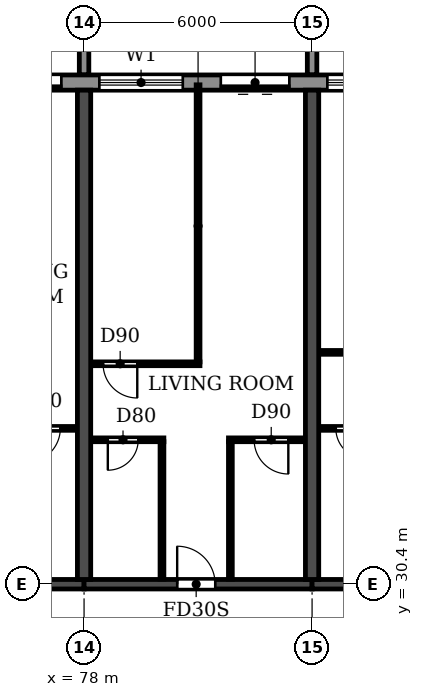
"""IFC4 building model, lengths in metres.
Left out: names, types, materials, properties, quantities, classifications, styles, units other than length and angle.
Written with IfcOpenShell. Run it as: python <this file> out.ifc"""

import sys

from ifc_helpers import new_model, si_unit, direction, frame, frame_2d, origin, place, context, subcontext, project, spatial, polyline, rectangle, outline, extrude, source, transform, mapped, element, fill, save


model = new_model("IFC4")
c1 = context("Model", 3, precision=1e-05, world=origin(), true_north=direction((0.0, 1.0)))
c2 = subcontext(c1, "Body", "Model", "MODEL_VIEW")
j1 = project(units=[si_unit("LENGTHUNIT", "METRE"), si_unit("PLANEANGLEUNIT", "RADIAN")], contexts=[c1])
p1 = place(None, origin())
s1 = spatial("IfcSite", under=j1, at=p1, CompositionType="ELEMENT")
p2 = place(p1, origin())
s2 = spatial("IfcBuilding", under=s1, at=p2, CompositionType="ELEMENT")
p3 = place(p2, frame((0.0, 0.0, 92.7)))
s3 = spatial("IfcBuildingStorey", under=s2, at=p3, CompositionType="ELEMENT", Elevation=92.7)
for number, where, z_axis, x_axis in (
    (1, (78.0, 30.525, 0.0), (0.0, 0.0, 1.0), (0.0, 1.0, 0.0)),
    (2, (84.0, 30.525, 0.0), (0.0, 0.0, 1.0), (0.0, 1.0, 0.0)),
):
    element("IfcWall", number, at=place(p3, frame(where, z_axis=z_axis, x_axis=x_axis)), inside=s3, PredefinedType="SHEAR", context=c2, shape_type="SweptSolid", body=[
        extrude(rectangle(XDim=12.875, YDim=0.35, at=frame_2d((6.438, 0.0))), origin(), (0.0, 0.0, 1.0), 3.06),
    ])
p4 = place(p3, frame((72.0, 30.4, 0.0), z_axis=(0.0, 0.0, 1.0), x_axis=(1.0, 0.0, 0.0)))
e3 = element("IfcWall", 3, at=p4, inside=s3, PredefinedType="SHEAR", context=c2, shape_type="SweptSolid", body=[
    extrude(rectangle(XDim=6.0, YDim=0.25, at=frame_2d((3.0, 0.0))), origin(), (0.0, 0.0, 1.0), 2.46),
])
p5 = place(p4, frame((2.45, 0.0, 0.0)))
e4 = element("IfcOpeningElement", 4, at=p5, cuts=e3, PredefinedType="OPENING", context=c2, shape_type="SweptSolid", body=[
    extrude(rectangle(XDim=1.0, YDim=2.1, at=frame_2d((0.5, 1.05))), frame((0.0, 0.135, 0.0), z_axis=(0.0, -1.0, 0.0), x_axis=(1.0, 0.0, 0.0)), (0.0, 0.0, 1.0), 0.27),
])
p6 = place(p3, frame((78.0, 30.4, 0.0), z_axis=(0.0, 0.0, 1.0), x_axis=(1.0, 0.0, 0.0)))
e5 = element("IfcWall", 5, at=p6, inside=s3, PredefinedType="SHEAR", context=c2, shape_type="SweptSolid", body=[
    extrude(rectangle(XDim=6.0, YDim=0.25, at=frame_2d((3.0, 0.0))), origin(), (0.0, 0.0, 1.0), 2.46),
])
p7 = place(p6, frame((2.45, 0.0, 0.0)))
e6 = element("IfcOpeningElement", 6, at=p7, cuts=e5, PredefinedType="OPENING", context=c2, shape_type="SweptSolid", body=[
    extrude(rectangle(XDim=1.0, YDim=2.1, at=frame_2d((0.5, 1.05))), frame((0.0, 0.135, 0.0), z_axis=(0.0, -1.0, 0.0), x_axis=(1.0, 0.0, 0.0)), (0.0, 0.0, 1.0), 0.27),
])
p8 = place(p3, frame((84.0, 30.4, 0.0), z_axis=(0.0, 0.0, 1.0), x_axis=(1.0, 0.0, 0.0)))
e7 = element("IfcWall", 7, at=p8, inside=s3, PredefinedType="SHEAR", context=c2, shape_type="SweptSolid", body=[
    extrude(rectangle(XDim=6.0, YDim=0.25, at=frame_2d((3.0, 0.0))), origin(), (0.0, 0.0, 1.0), 2.46),
])
p9 = place(p8, frame((2.45, 0.0, 0.0)))
e8 = element("IfcOpeningElement", 8, at=p9, cuts=e7, PredefinedType="OPENING", context=c2, shape_type="SweptSolid", body=[
    extrude(rectangle(XDim=1.0, YDim=2.1, at=frame_2d((0.5, 1.05))), frame((0.0, 0.135, 0.0), z_axis=(0.0, -1.0, 0.0), x_axis=(1.0, 0.0, 0.0)), (0.0, 0.0, 1.0), 0.27),
])
p10 = place(p3, frame((91.317, 43.6, 0.0), z_axis=(0.0, 0.0, 1.0), x_axis=(-1.0, 0.0, 0.0)))
e9 = element("IfcWall", 9, at=p10, inside=s3, PredefinedType="STANDARD", context=c2, shape_type="SweptSolid", body=[
    extrude(rectangle(XDim=80.634, YDim=0.4, at=frame_2d((40.317, 0.0))), origin(), (0.0, 0.0, 1.0), 3.06),
])
p11 = place(p10, frame((76.717, 0.0, 0.9)))
e10 = element("IfcOpeningElement", 10, at=p11, cuts=e9, PredefinedType="OPENING", context=c2, shape_type="SweptSolid", body=[
    extrude(rectangle(XDim=2.2, YDim=1.5, at=frame_2d((1.1, 0.75))), frame((0.0, 0.21, 0.0), z_axis=(0.0, -1.0, 0.0), x_axis=(1.0, 0.0, 0.0)), (0.0, 0.0, 1.0), 0.42),
])
p12 = place(p10, frame((73.917, 0.0, 0.0)))
e11 = element("IfcOpeningElement", 11, at=p12, cuts=e9, PredefinedType="OPENING", context=c2, shape_type="SweptSolid", body=[
    extrude(rectangle(XDim=1.8, YDim=2.4, at=frame_2d((0.9, 1.2))), frame((0.0, 0.21, 0.0), z_axis=(0.0, -1.0, 0.0), x_axis=(1.0, 0.0, 0.0)), (0.0, 0.0, 1.0), 0.42),
])
p13 = place(p10, frame((70.717, 0.0, 0.9)))
e12 = element("IfcOpeningElement", 12, at=p13, cuts=e9, PredefinedType="OPENING", context=c2, shape_type="SweptSolid", body=[
    extrude(rectangle(XDim=2.2, YDim=1.5, at=frame_2d((1.1, 0.75))), frame((0.0, 0.21, 0.0), z_axis=(0.0, -1.0, 0.0), x_axis=(1.0, 0.0, 0.0)), (0.0, 0.0, 1.0), 0.42),
])
p14 = place(p10, frame((67.717, 0.0, 0.9)))
e13 = element("IfcOpeningElement", 13, at=p14, cuts=e9, PredefinedType="OPENING", context=c2, shape_type="SweptSolid", body=[
    extrude(rectangle(XDim=2.2, YDim=1.5, at=frame_2d((1.1, 0.75))), frame((0.0, 0.21, 0.0), z_axis=(0.0, -1.0, 0.0), x_axis=(1.0, 0.0, 0.0)), (0.0, 0.0, 1.0), 0.42),
])
p15 = place(p10, frame((64.717, 0.0, 0.9)))
e14 = element("IfcOpeningElement", 14, at=p15, cuts=e9, PredefinedType="OPENING", context=c2, shape_type="SweptSolid", body=[
    extrude(rectangle(XDim=2.2, YDim=1.5, at=frame_2d((1.1, 0.75))), frame((0.0, 0.21, 0.0), z_axis=(0.0, -1.0, 0.0), x_axis=(1.0, 0.0, 0.0)), (0.0, 0.0, 1.0), 0.42),
])
p16 = place(p10, frame((61.917, 0.0, 0.0)))
e15 = element("IfcOpeningElement", 15, at=p16, cuts=e9, PredefinedType="OPENING", context=c2, shape_type="SweptSolid", body=[
    extrude(rectangle(XDim=1.8, YDim=2.4, at=frame_2d((0.9, 1.2))), frame((0.0, 0.21, 0.0), z_axis=(0.0, -1.0, 0.0), x_axis=(1.0, 0.0, 0.0)), (0.0, 0.0, 1.0), 0.42),
])
p17 = place(p10, frame((58.717, 0.0, 0.9)))
e16 = element("IfcOpeningElement", 16, at=p17, cuts=e9, PredefinedType="OPENING", context=c2, shape_type="SweptSolid", body=[
    extrude(rectangle(XDim=2.2, YDim=1.5, at=frame_2d((1.1, 0.75))), frame((0.0, 0.21, 0.0), z_axis=(0.0, -1.0, 0.0), x_axis=(1.0, 0.0, 0.0)), (0.0, 0.0, 1.0), 0.42),
])
p18 = place(p10, frame((55.717, 0.0, 0.9)))
e17 = element("IfcOpeningElement", 17, at=p18, cuts=e9, PredefinedType="OPENING", context=c2, shape_type="SweptSolid", body=[
    extrude(rectangle(XDim=2.2, YDim=1.5, at=frame_2d((1.1, 0.75))), frame((0.0, 0.21, 0.0), z_axis=(0.0, -1.0, 0.0), x_axis=(1.0, 0.0, 0.0)), (0.0, 0.0, 1.0), 0.42),
])
p19 = place(p10, frame((52.917, 0.0, 0.0)))
e18 = element("IfcOpeningElement", 18, at=p19, cuts=e9, PredefinedType="OPENING", context=c2, shape_type="SweptSolid", body=[
    extrude(rectangle(XDim=1.8, YDim=2.4, at=frame_2d((0.9, 1.2))), frame((0.0, 0.21, 0.0), z_axis=(0.0, -1.0, 0.0), x_axis=(1.0, 0.0, 0.0)), (0.0, 0.0, 1.0), 0.42),
])
p20 = place(p10, frame((49.717, 0.0, 0.9)))
e19 = element("IfcOpeningElement", 19, at=p20, cuts=e9, PredefinedType="OPENING", context=c2, shape_type="SweptSolid", body=[
    extrude(rectangle(XDim=2.2, YDim=1.5, at=frame_2d((1.1, 0.75))), frame((0.0, 0.21, 0.0), z_axis=(0.0, -1.0, 0.0), x_axis=(1.0, 0.0, 0.0)), (0.0, 0.0, 1.0), 0.42),
])
p21 = place(p10, frame((46.717, 0.0, 0.9)))
e20 = element("IfcOpeningElement", 20, at=p21, cuts=e9, PredefinedType="OPENING", context=c2, shape_type="SweptSolid", body=[
    extrude(rectangle(XDim=2.2, YDim=1.5, at=frame_2d((1.1, 0.75))), frame((0.0, 0.21, 0.0), z_axis=(0.0, -1.0, 0.0), x_axis=(1.0, 0.0, 0.0)), (0.0, 0.0, 1.0), 0.42),
])
p22 = place(p10, frame((43.717, 0.0, 0.9)))
e21 = element("IfcOpeningElement", 21, at=p22, cuts=e9, PredefinedType="OPENING", context=c2, shape_type="SweptSolid", body=[
    extrude(rectangle(XDim=2.2, YDim=1.5, at=frame_2d((1.1, 0.75))), frame((0.0, 0.21, 0.0), z_axis=(0.0, -1.0, 0.0), x_axis=(1.0, 0.0, 0.0)), (0.0, 0.0, 1.0), 0.42),
])
p23 = place(p10, frame((40.717, 0.0, 0.9)))
e22 = element("IfcOpeningElement", 22, at=p23, cuts=e9, PredefinedType="OPENING", context=c2, shape_type="SweptSolid", body=[
    extrude(rectangle(XDim=2.2, YDim=1.5, at=frame_2d((1.1, 0.75))), frame((0.0, 0.21, 0.0), z_axis=(0.0, -1.0, 0.0), x_axis=(1.0, 0.0, 0.0)), (0.0, 0.0, 1.0), 0.42),
])
p24 = place(p10, frame((37.917, 0.0, 0.0)))
e23 = element("IfcOpeningElement", 23, at=p24, cuts=e9, PredefinedType="OPENING", context=c2, shape_type="SweptSolid", body=[
    extrude(rectangle(XDim=1.8, YDim=2.4, at=frame_2d((0.9, 1.2))), frame((0.0, 0.21, 0.0), z_axis=(0.0, -1.0, 0.0), x_axis=(1.0, 0.0, 0.0)), (0.0, 0.0, 1.0), 0.42),
])
p25 = place(p10, frame((34.917, 0.0, 0.0)))
e24 = element("IfcOpeningElement", 24, at=p25, cuts=e9, PredefinedType="OPENING", context=c2, shape_type="SweptSolid", body=[
    extrude(rectangle(XDim=1.8, YDim=2.4, at=frame_2d((0.9, 1.2))), frame((0.0, 0.21, 0.0), z_axis=(0.0, -1.0, 0.0), x_axis=(1.0, 0.0, 0.0)), (0.0, 0.0, 1.0), 0.42),
])
p26 = place(p10, frame((31.717, 0.0, 0.9)))
e25 = element("IfcOpeningElement", 25, at=p26, cuts=e9, PredefinedType="OPENING", context=c2, shape_type="SweptSolid", body=[
    extrude(rectangle(XDim=2.2, YDim=1.5, at=frame_2d((1.1, 0.75))), frame((0.0, 0.21, 0.0), z_axis=(0.0, -1.0, 0.0), x_axis=(1.0, 0.0, 0.0)), (0.0, 0.0, 1.0), 0.42),
])
p27 = place(p10, frame((28.717, 0.0, 0.9)))
e26 = element("IfcOpeningElement", 26, at=p27, cuts=e9, PredefinedType="OPENING", context=c2, shape_type="SweptSolid", body=[
    extrude(rectangle(XDim=2.2, YDim=1.5, at=frame_2d((1.1, 0.75))), frame((0.0, 0.21, 0.0), z_axis=(0.0, -1.0, 0.0), x_axis=(1.0, 0.0, 0.0)), (0.0, 0.0, 1.0), 0.42),
])
p28 = place(p10, frame((25.717, 0.0, 0.9)))
e27 = element("IfcOpeningElement", 27, at=p28, cuts=e9, PredefinedType="OPENING", context=c2, shape_type="SweptSolid", body=[
    extrude(rectangle(XDim=2.2, YDim=1.5, at=frame_2d((1.1, 0.75))), frame((0.0, 0.21, 0.0), z_axis=(0.0, -1.0, 0.0), x_axis=(1.0, 0.0, 0.0)), (0.0, 0.0, 1.0), 0.42),
])
p29 = place(p10, frame((22.717, 0.0, 0.9)))
e28 = element("IfcOpeningElement", 28, at=p29, cuts=e9, PredefinedType="OPENING", context=c2, shape_type="SweptSolid", body=[
    extrude(rectangle(XDim=2.2, YDim=1.5, at=frame_2d((1.1, 0.75))), frame((0.0, 0.21, 0.0), z_axis=(0.0, -1.0, 0.0), x_axis=(1.0, 0.0, 0.0)), (0.0, 0.0, 1.0), 0.42),
])
p30 = place(p10, frame((19.917, 0.0, 0.0)))
e29 = element("IfcOpeningElement", 29, at=p30, cuts=e9, PredefinedType="OPENING", context=c2, shape_type="SweptSolid", body=[
    extrude(rectangle(XDim=1.8, YDim=2.4, at=frame_2d((0.9, 1.2))), frame((0.0, 0.21, 0.0), z_axis=(0.0, -1.0, 0.0), x_axis=(1.0, 0.0, 0.0)), (0.0, 0.0, 1.0), 0.42),
])
p31 = place(p10, frame((16.717, 0.0, 0.9)))
e30 = element("IfcOpeningElement", 30, at=p31, cuts=e9, PredefinedType="OPENING", context=c2, shape_type="SweptSolid", body=[
    extrude(rectangle(XDim=2.2, YDim=1.5, at=frame_2d((1.1, 0.75))), frame((0.0, 0.21, 0.0), z_axis=(0.0, -1.0, 0.0), x_axis=(1.0, 0.0, 0.0)), (0.0, 0.0, 1.0), 0.42),
])
p32 = place(p10, frame((13.917, 0.0, 0.0)))
e31 = element("IfcOpeningElement", 31, at=p32, cuts=e9, PredefinedType="OPENING", context=c2, shape_type="SweptSolid", body=[
    extrude(rectangle(XDim=1.8, YDim=2.4, at=frame_2d((0.9, 1.2))), frame((0.0, 0.21, 0.0), z_axis=(0.0, -1.0, 0.0), x_axis=(1.0, 0.0, 0.0)), (0.0, 0.0, 1.0), 0.42),
])
p33 = place(p10, frame((10.717, 0.0, 0.9)))
e32 = element("IfcOpeningElement", 32, at=p33, cuts=e9, PredefinedType="OPENING", context=c2, shape_type="SweptSolid", body=[
    extrude(rectangle(XDim=2.2, YDim=1.5, at=frame_2d((1.1, 0.75))), frame((0.0, 0.21, 0.0), z_axis=(0.0, -1.0, 0.0), x_axis=(1.0, 0.0, 0.0)), (0.0, 0.0, 1.0), 0.42),
])
p34 = place(p10, frame((7.917, 0.0, 0.0)))
e33 = element("IfcOpeningElement", 33, at=p34, cuts=e9, PredefinedType="OPENING", context=c2, shape_type="SweptSolid", body=[
    extrude(rectangle(XDim=1.8, YDim=2.4, at=frame_2d((0.9, 1.2))), frame((0.0, 0.21, 0.0), z_axis=(0.0, -1.0, 0.0), x_axis=(1.0, 0.0, 0.0)), (0.0, 0.0, 1.0), 0.42),
])
p35 = place(p10, frame((4.717, 0.0, 0.9)))
e34 = element("IfcOpeningElement", 34, at=p35, cuts=e9, PredefinedType="OPENING", context=c2, shape_type="SweptSolid", body=[
    extrude(rectangle(XDim=2.2, YDim=1.5, at=frame_2d((1.1, 0.75))), frame((0.0, 0.21, 0.0), z_axis=(0.0, -1.0, 0.0), x_axis=(1.0, 0.0, 0.0)), (0.0, 0.0, 1.0), 0.42),
])
p36 = place(p10, frame((1.917, 0.0, 0.0)))
e35 = element("IfcOpeningElement", 35, at=p36, cuts=e9, PredefinedType="OPENING", context=c2, shape_type="SweptSolid", body=[
    extrude(rectangle(XDim=1.8, YDim=2.4, at=frame_2d((0.9, 1.2))), frame((0.0, 0.21, 0.0), z_axis=(0.0, -1.0, 0.0), x_axis=(1.0, 0.0, 0.0)), (0.0, 0.0, 1.0), 0.42),
])
m1 = source(origin(), c2, "Body", "SweptSolid", [
    extrude(outline(polyline([(0.0, 0.0), (0.25, 0.0), (0.25, 3.1), (0.0, 3.1), (0.0, 0.0)])), origin(), (0.0, 0.0, 1.0), 3.1),
])
for number, where in (
    (36, (77.875, 43.8, 0.0)),
    (37, (83.875, 43.8, 0.0)),
):
    element("IfcWall", number, at=place(p3, frame(where)), inside=s3, PredefinedType="STANDARD", context=c2, shape_type="MappedRepresentation", body=[
        mapped(m1, transform((0.0, 0.0, 0.0))),
    ])
p37 = place(p3, frame((78.185, 34.2, 0.0), z_axis=(0.0, 0.0, 1.0), x_axis=(1.0, 0.0, 0.0)))
e38 = element("IfcWall", 38, at=p37, inside=s3, PredefinedType="PARTITIONING", context=c2, shape_type="SweptSolid", body=[
    extrude(rectangle(XDim=1.915, YDim=0.1, at=frame_2d((0.958, 0.0))), origin(), (0.0, 0.0, 1.0), 3.06),
])
p38 = place(p37, frame((0.44, 0.0, 0.0)))
e39 = element("IfcOpeningElement", 39, at=p38, cuts=e38, PredefinedType="OPENING", context=c2, shape_type="SweptSolid", body=[
    extrude(rectangle(XDim=0.8, YDim=2.1, at=frame_2d((0.4, 1.05))), frame((0.0, 0.06, 0.0), z_axis=(0.0, -1.0, 0.0), x_axis=(1.0, 0.0, 0.0)), (0.0, 0.0, 1.0), 0.12),
])
p39 = place(p3, frame((81.8, 34.2, 0.0), z_axis=(0.0, 0.0, 1.0), x_axis=(1.0, 0.0, 0.0)))
e40 = element("IfcWall", 40, at=p39, inside=s3, PredefinedType="PARTITIONING", context=c2, shape_type="SweptSolid", body=[
    extrude(rectangle(XDim=2.015, YDim=0.1, at=frame_2d((1.007, 0.0))), origin(), (0.0, 0.0, 1.0), 3.06),
])
p40 = place(p39, frame((0.675, 0.0, 0.0)))
e41 = element("IfcOpeningElement", 41, at=p40, cuts=e40, PredefinedType="OPENING", context=c2, shape_type="SweptSolid", body=[
    extrude(rectangle(XDim=0.9, YDim=2.1, at=frame_2d((0.45, 1.05))), frame((0.0, 0.06, 0.0), z_axis=(0.0, -1.0, 0.0), x_axis=(1.0, 0.0, 0.0)), (0.0, 0.0, 1.0), 0.12),
])
p41 = place(p3, frame((75.8, 34.5, 0.0), z_axis=(0.0, 0.0, 1.0), x_axis=(1.0, 0.0, 0.0)))
e42 = element("IfcWall", 42, at=p41, inside=s3, PredefinedType="PARTITIONING", context=c2, shape_type="SweptSolid", body=[
    extrude(rectangle(XDim=2.015, YDim=0.1, at=frame_2d((1.007, 0.0))), origin(), (0.0, 0.0, 1.0), 3.06),
])
p42 = place(p41, frame((0.675, 0.0, 0.0)))
e43 = element("IfcOpeningElement", 43, at=p42, cuts=e42, PredefinedType="OPENING", context=c2, shape_type="SweptSolid", body=[
    extrude(rectangle(XDim=0.9, YDim=2.1, at=frame_2d((0.45, 1.05))), frame((0.0, 0.06, 0.0), z_axis=(0.0, -1.0, 0.0), x_axis=(1.0, 0.0, 0.0)), (0.0, 0.0, 1.0), 0.12),
])
p43 = place(p3, frame((84.185, 34.5, 0.0), z_axis=(0.0, 0.0, 1.0), x_axis=(1.0, 0.0, 0.0)))
e44 = element("IfcWall", 44, at=p43, inside=s3, PredefinedType="PARTITIONING", context=c2, shape_type="SweptSolid", body=[
    extrude(rectangle(XDim=1.915, YDim=0.1, at=frame_2d((0.958, 0.0))), origin(), (0.0, 0.0, 1.0), 3.06),
])
p44 = place(p43, frame((0.44, 0.0, 0.0)))
e45 = element("IfcOpeningElement", 45, at=p44, cuts=e44, PredefinedType="OPENING", context=c2, shape_type="SweptSolid", body=[
    extrude(rectangle(XDim=0.8, YDim=2.1, at=frame_2d((0.4, 1.05))), frame((0.0, 0.06, 0.0), z_axis=(0.0, -1.0, 0.0), x_axis=(1.0, 0.0, 0.0)), (0.0, 0.0, 1.0), 0.12),
])
p45 = place(p3, frame((78.185, 36.2, 0.0), z_axis=(0.0, 0.0, 1.0), x_axis=(1.0, 0.0, 0.0)))
e46 = element("IfcWall", 46, at=p45, inside=s3, PredefinedType="PARTITIONING", context=c2, shape_type="SweptSolid", body=[
    extrude(rectangle(XDim=2.865, YDim=0.1, at=frame_2d((1.433, 0.0))), origin(), (0.0, 0.0, 1.0), 3.06),
])
p46 = place(p45, frame((0.315, 0.0, 0.0)))
e47 = element("IfcOpeningElement", 47, at=p46, cuts=e46, PredefinedType="OPENING", context=c2, shape_type="SweptSolid", body=[
    extrude(rectangle(XDim=0.9, YDim=2.1, at=frame_2d((0.45, 1.05))), frame((0.0, 0.06, 0.0), z_axis=(0.0, -1.0, 0.0), x_axis=(1.0, 0.0, 0.0)), (0.0, 0.0, 1.0), 0.12),
])
p47 = place(p3, frame((84.185, 36.5, 0.0), z_axis=(0.0, 0.0, 1.0), x_axis=(1.0, 0.0, 0.0)))
e48 = element("IfcWall", 48, at=p47, inside=s3, PredefinedType="PARTITIONING", context=c2, shape_type="SweptSolid", body=[
    extrude(rectangle(XDim=2.865, YDim=0.1, at=frame_2d((1.433, 0.0))), origin(), (0.0, 0.0, 1.0), 3.06),
])
p48 = place(p47, frame((1.415, 0.0, 0.0)))
e49 = element("IfcOpeningElement", 49, at=p48, cuts=e48, PredefinedType="OPENING", context=c2, shape_type="SweptSolid", body=[
    extrude(rectangle(XDim=0.9, YDim=2.1, at=frame_2d((0.45, 1.05))), frame((0.0, 0.06, 0.0), z_axis=(0.0, -1.0, 0.0), x_axis=(1.0, 0.0, 0.0)), (0.0, 0.0, 1.0), 0.12),
])
p49 = place(p3, frame((80.05, 30.535, 0.0), z_axis=(0.0, 0.0, 1.0), x_axis=(0.0, 1.0, 0.0)))
e50 = element("IfcWall", 50, at=p49, inside=s3, PredefinedType="PARTITIONING", context=c2, shape_type="SweptSolid", body=[
    extrude(rectangle(XDim=3.615, YDim=0.1, at=frame_2d((1.808, 0.0))), origin(), (0.0, 0.0, 1.0), 3.06),
])
p50 = place(p3, frame((81.0, 36.25, 0.0), z_axis=(0.0, 0.0, 1.0), x_axis=(0.0, 1.0, 0.0)))
e51 = element("IfcWall", 51, at=p50, inside=s3, PredefinedType="PARTITIONING", context=c2, shape_type="SweptSolid", body=[
    extrude(rectangle(XDim=7.29, YDim=0.1, at=frame_2d((3.645, 0.0))), origin(), (0.0, 0.0, 1.0), 3.06),
])
p51 = place(p3, frame((81.85, 30.535, 0.0), z_axis=(0.0, 0.0, 1.0), x_axis=(0.0, 1.0, 0.0)))
e52 = element("IfcWall", 52, at=p51, inside=s3, PredefinedType="PARTITIONING", context=c2, shape_type="SweptSolid", body=[
    extrude(rectangle(XDim=3.615, YDim=0.1, at=frame_2d((1.808, 0.0))), origin(), (0.0, 0.0, 1.0), 3.06),
])
p52 = place(p32, origin())
e53 = element("IfcDoor", 53, at=p52, inside=s3, OperationType="DOUBLE_DOOR_SLIDING", PredefinedType="DOOR", context=c2, shape_type="SweptSolid", body=[
    extrude(rectangle(XDim=1.8, YDim=2.4, at=frame_2d((0.9, 1.2))), frame((0.0, 0.025, 0.0), z_axis=(0.0, -1.0, 0.0), x_axis=(1.0, 0.0, 0.0)), (0.0, 0.0, 1.0), 0.05),
])
fill(e31, e53)
p53 = place(p33, origin())
e54 = element("IfcWindow", 54, at=p53, inside=s3, PartitioningType="DOUBLE_PANEL_HORIZONTAL", PredefinedType="WINDOW", context=c2, shape_type="SweptSolid", body=[
    extrude(rectangle(XDim=2.2, YDim=1.5, at=frame_2d((1.1, 0.75))), frame((0.0, 0.03, 0.0), z_axis=(0.0, -1.0, 0.0), x_axis=(1.0, 0.0, 0.0)), (0.0, 0.0, 1.0), 0.06),
])
fill(e32, e54)
p54 = place(p34, origin())
e55 = element("IfcDoor", 55, at=p54, inside=s3, OperationType="DOUBLE_DOOR_SLIDING", PredefinedType="DOOR", context=c2, shape_type="SweptSolid", body=[
    extrude(rectangle(XDim=1.8, YDim=2.4, at=frame_2d((0.9, 1.2))), frame((0.0, 0.025, 0.0), z_axis=(0.0, -1.0, 0.0), x_axis=(1.0, 0.0, 0.0)), (0.0, 0.0, 1.0), 0.05),
])
fill(e33, e55)
p55 = place(p35, origin())
e56 = element("IfcWindow", 56, at=p55, inside=s3, PartitioningType="DOUBLE_PANEL_HORIZONTAL", PredefinedType="WINDOW", context=c2, shape_type="SweptSolid", body=[
    extrude(rectangle(XDim=2.2, YDim=1.5, at=frame_2d((1.1, 0.75))), frame((0.0, 0.03, 0.0), z_axis=(0.0, -1.0, 0.0), x_axis=(1.0, 0.0, 0.0)), (0.0, 0.0, 1.0), 0.06),
])
fill(e34, e56)
p56 = place(p42, frame((0.9, 0.0, 0.0), z_axis=(0.0, 0.0, 1.0), x_axis=(-1.0, 0.0, 0.0)))
e57 = element("IfcDoor", 57, at=p56, inside=s3, OperationType="SINGLE_SWING_RIGHT", PredefinedType="DOOR", context=c2, shape_type="SweptSolid", body=[
    extrude(rectangle(XDim=0.9, YDim=2.1, at=frame_2d((0.45, 1.05))), frame((0.0, 0.025, 0.0), z_axis=(0.0, -1.0, 0.0), x_axis=(1.0, 0.0, 0.0)), (0.0, 0.0, 1.0), 0.05),
])
fill(e43, e57)
p57 = place(p46, frame((0.9, 0.0, 0.0), z_axis=(0.0, 0.0, 1.0), x_axis=(-1.0, 0.0, 0.0)))
e58 = element("IfcDoor", 58, at=p57, inside=s3, OperationType="SINGLE_SWING_LEFT", PredefinedType="DOOR", context=c2, shape_type="SweptSolid", body=[
    extrude(rectangle(XDim=0.9, YDim=2.1, at=frame_2d((0.45, 1.05))), frame((0.0, 0.025, 0.0), z_axis=(0.0, -1.0, 0.0), x_axis=(1.0, 0.0, 0.0)), (0.0, 0.0, 1.0), 0.05),
])
fill(e47, e58)
p58 = place(p38, frame((0.8, 0.0, 0.0), z_axis=(0.0, 0.0, 1.0), x_axis=(-1.0, 0.0, 0.0)))
e59 = element("IfcDoor", 59, at=p58, inside=s3, OperationType="SINGLE_SWING_RIGHT", PredefinedType="DOOR", context=c2, shape_type="SweptSolid", body=[
    extrude(rectangle(XDim=0.8, YDim=2.1, at=frame_2d((0.4, 1.05))), frame((0.0, 0.025, 0.0), z_axis=(0.0, -1.0, 0.0), x_axis=(1.0, 0.0, 0.0)), (0.0, 0.0, 1.0), 0.05),
])
fill(e39, e59)
p59 = place(p7, origin())
e60 = element("IfcDoor", 60, at=p59, inside=s3, OperationType="SINGLE_SWING_LEFT", PredefinedType="DOOR", context=c2, shape_type="SweptSolid", body=[
    extrude(rectangle(XDim=1.0, YDim=2.1, at=frame_2d((0.5, 1.05))), frame((0.0, 0.025, 0.0), z_axis=(0.0, -1.0, 0.0), x_axis=(1.0, 0.0, 0.0)), (0.0, 0.0, 1.0), 0.05),
])
fill(e6, e60)
p60 = place(p40, frame((0.9, 0.0, 0.0), z_axis=(0.0, 0.0, 1.0), x_axis=(-1.0, 0.0, 0.0)))
e61 = element("IfcDoor", 61, at=p60, inside=s3, OperationType="SINGLE_SWING_LEFT", PredefinedType="DOOR", context=c2, shape_type="SweptSolid", body=[
    extrude(rectangle(XDim=0.9, YDim=2.1, at=frame_2d((0.45, 1.05))), frame((0.0, 0.025, 0.0), z_axis=(0.0, -1.0, 0.0), x_axis=(1.0, 0.0, 0.0)), (0.0, 0.0, 1.0), 0.05),
])
fill(e41, e61)
p61 = place(p44, frame((0.8, 0.0, 0.0), z_axis=(0.0, 0.0, 1.0), x_axis=(-1.0, 0.0, 0.0)))
e62 = element("IfcDoor", 62, at=p61, inside=s3, OperationType="SINGLE_SWING_LEFT", PredefinedType="DOOR", context=c2, shape_type="SweptSolid", body=[
    extrude(rectangle(XDim=0.8, YDim=2.1, at=frame_2d((0.4, 1.05))), frame((0.0, 0.025, 0.0), z_axis=(0.0, -1.0, 0.0), x_axis=(1.0, 0.0, 0.0)), (0.0, 0.0, 1.0), 0.05),
])
fill(e45, e62)
save(model, sys.argv[1])
